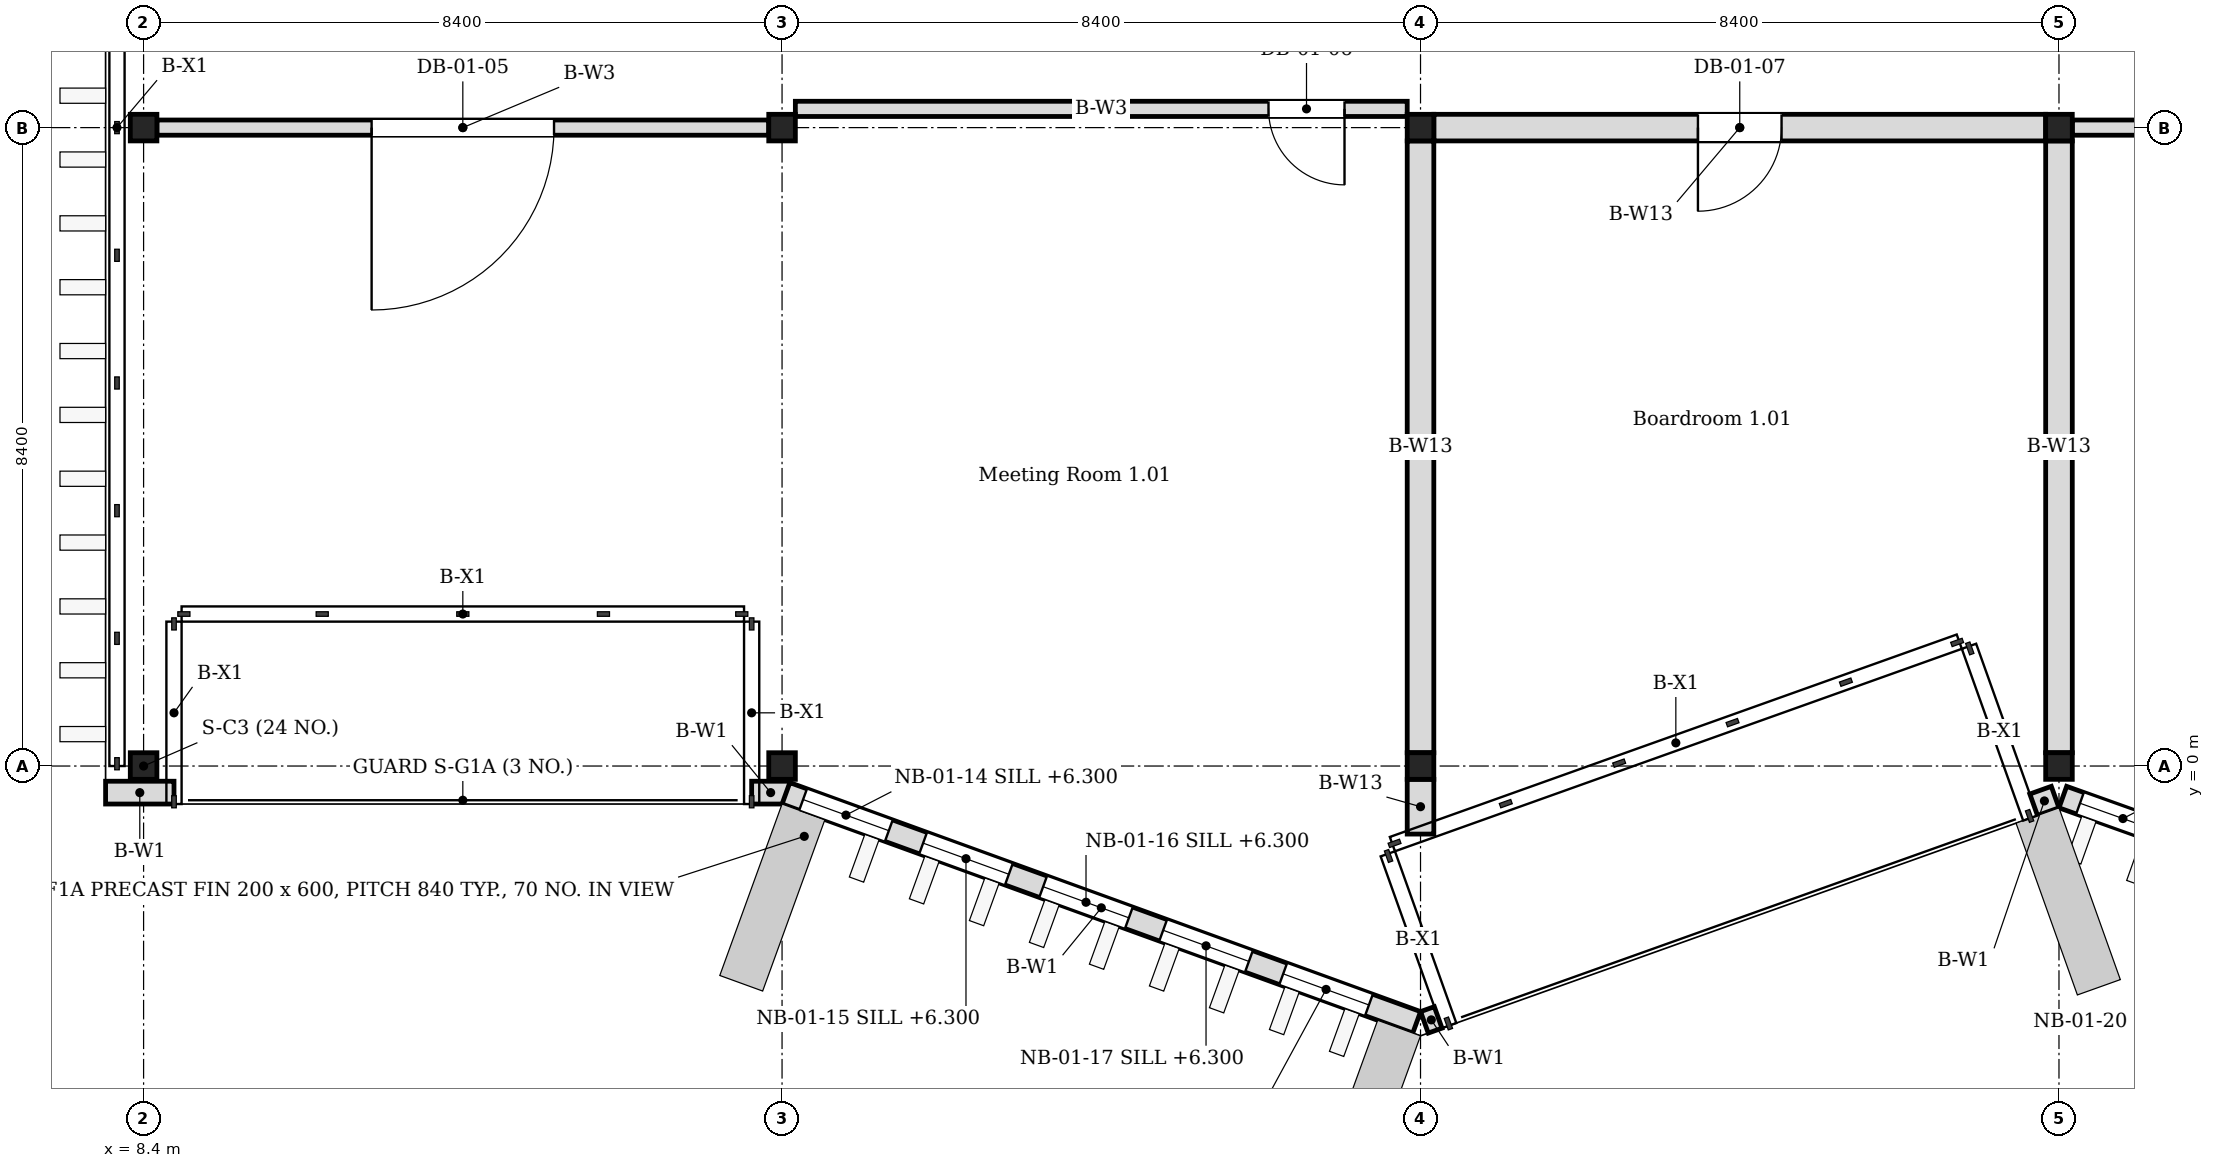
"""IFC4 building model, lengths in metres.
Left out: names, types, materials, properties, quantities, classifications, styles, units other than length and angle.
Written with IfcOpenShell. Run it as: python <this file> out.ifc"""

import sys

from ifc_helpers import new_model, si_unit, direction, frame, frame_2d, origin, origin_2d, place, context, subcontext, project, spatial, rectangle, i_section, extrude, element, fill, save


model = new_model("IFC4")
c1 = context("Model", 3, precision=1e-05, world=origin(), true_north=direction((0.0, 1.0)))
c2 = subcontext(c1, "Body", "Model", "MODEL_VIEW")
j1 = project(units=[si_unit("LENGTHUNIT", "METRE"), si_unit("PLANEANGLEUNIT", "RADIAN")], contexts=[c1])
p1 = place(None, origin())
s1 = spatial("IfcSite", under=j1, at=p1, CompositionType="ELEMENT")
p2 = place(p1, origin())
s2 = spatial("IfcBuilding", under=s1, at=p2, CompositionType="ELEMENT")
p3 = place(p2, frame((0.0, 0.0, 6.0)))
s3 = spatial("IfcBuildingStorey", under=s2, at=p3, CompositionType="ELEMENT", Elevation=6.0)
for number, where, z_axis, x_axis in (
    (1, (8.4, 0.0, 0.0), (0.0, 0.0, 1.0), (1.0, 0.0, 0.0)),
    (2, (8.4, 8.4, 0.0), (0.0, 0.0, 1.0), (1.0, 0.0, 0.0)),
    (3, (16.8, 0.0, 0.0), (0.0, 0.0, 1.0), (1.0, 0.0, 0.0)),
    (4, (16.8, 8.4, 0.0), (0.0, 0.0, 1.0), (1.0, 0.0, 0.0)),
    (5, (25.2, 0.0, 0.0), (0.0, 0.0, 1.0), (1.0, 0.0, 0.0)),
    (6, (25.2, 8.4, 0.0), (0.0, 0.0, 1.0), (1.0, 0.0, 0.0)),
    (7, (33.6, 0.0, 0.0), (0.0, 0.0, 1.0), (1.0, 0.0, 0.0)),
    (8, (33.6, 8.4, 0.0), (0.0, 0.0, 1.0), (1.0, 0.0, 0.0)),
):
    element("IfcColumn", number, at=place(p3, frame(where, z_axis=z_axis, x_axis=x_axis)), inside=s3, PredefinedType="COLUMN", context=c2, shape_type="SweptSolid", body=[
        extrude(i_section(OverallWidth=0.35, OverallDepth=0.35, WebThickness=0.012, FlangeThickness=0.019, FilletRadius=0.013, at=origin_2d()), origin(), (0.0, 0.0, 1.0), 4.2),
    ])
p4 = place(p3, frame((7.9, -0.35, 0.0), z_axis=(0.0, 0.0, 1.0), x_axis=(1.0, 0.0, 0.0)))
e9 = element("IfcWall", 9, at=p4, inside=s3, PredefinedType="SOLIDWALL", context=c2, shape_type="SweptSolid", body=[
    extrude(rectangle(XDim=0.9, YDim=0.3, at=frame_2d((0.45, 0.0))), origin(), (0.0, 0.0, 1.0), 4.05),
])
p5 = place(p3, frame((16.4, -0.35, 0.0), z_axis=(0.0, 0.0, 1.0), x_axis=(1.0, 0.0, 0.0)))
e10 = element("IfcWall", 10, at=p5, inside=s3, PredefinedType="SOLIDWALL", context=c2, shape_type="SweptSolid", body=[
    extrude(rectangle(XDim=0.5, YDim=0.3, at=frame_2d((0.25, 0.0))), origin(), (0.0, 0.0, 1.0), 4.05),
])
p6 = place(p3, frame((16.851, -0.359, 0.0), z_axis=(0.0, 0.0, 1.0), x_axis=(0.939953187971, -0.341303390584, 0.0)))
e11 = element("IfcWall", 11, at=p6, inside=s3, PredefinedType="SOLIDWALL", context=c2, shape_type="SweptSolid", body=[
    extrude(rectangle(XDim=8.828, YDim=0.3, at=frame_2d((4.414, 0.0))), origin(), (0.0, 0.0, 1.0), 4.05),
])
p7 = place(p6, frame((0.24, 0.0, 0.3)))
e12 = element("IfcOpeningElement", 12, at=p7, cuts=e11, PredefinedType="OPENING", context=c2, shape_type="SweptSolid", body=[
    extrude(rectangle(XDim=1.2, YDim=3.3, at=frame_2d((0.6, 1.65))), frame((0.0, 0.16, 0.0), z_axis=(0.0, -1.0, 0.0), x_axis=(1.0, 0.0, 0.0)), (0.0, 0.0, 1.0), 0.32),
])
p8 = place(p6, frame((1.92, 0.0, 0.3)))
e13 = element("IfcOpeningElement", 13, at=p8, cuts=e11, PredefinedType="OPENING", context=c2, shape_type="SweptSolid", body=[
    extrude(rectangle(XDim=1.2, YDim=3.3, at=frame_2d((0.6, 1.65))), frame((0.0, 0.16, 0.0), z_axis=(0.0, -1.0, 0.0), x_axis=(1.0, 0.0, 0.0)), (0.0, 0.0, 1.0), 0.32),
])
p9 = place(p6, frame((3.6, 0.0, 0.3)))
e14 = element("IfcOpeningElement", 14, at=p9, cuts=e11, PredefinedType="OPENING", context=c2, shape_type="SweptSolid", body=[
    extrude(rectangle(XDim=1.2, YDim=3.3, at=frame_2d((0.6, 1.65))), frame((0.0, 0.16, 0.0), z_axis=(0.0, -1.0, 0.0), x_axis=(1.0, 0.0, 0.0)), (0.0, 0.0, 1.0), 0.32),
])
p10 = place(p6, frame((5.28, 0.0, 0.3)))
e15 = element("IfcOpeningElement", 15, at=p10, cuts=e11, PredefinedType="OPENING", context=c2, shape_type="SweptSolid", body=[
    extrude(rectangle(XDim=1.2, YDim=3.3, at=frame_2d((0.6, 1.65))), frame((0.0, 0.16, 0.0), z_axis=(0.0, -1.0, 0.0), x_axis=(1.0, 0.0, 0.0)), (0.0, 0.0, 1.0), 0.32),
])
p11 = place(p6, frame((6.96, 0.0, 0.3)))
e16 = element("IfcOpeningElement", 16, at=p11, cuts=e11, PredefinedType="OPENING", context=c2, shape_type="SweptSolid", body=[
    extrude(rectangle(XDim=1.2, YDim=3.3, at=frame_2d((0.6, 1.65))), frame((0.0, 0.16, 0.0), z_axis=(0.0, -1.0, 0.0), x_axis=(1.0, 0.0, 0.0)), (0.0, 0.0, 1.0), 0.32),
])
p12 = place(p3, frame((25.251, -3.372, 0.0), z_axis=(0.0, 0.0, 1.0), x_axis=(0.942000485661, 0.335611509061, 0.0)))
e17 = element("IfcWall", 17, at=p12, inside=s3, PredefinedType="SOLIDWALL", context=c2, shape_type="SweptSolid", body=[
    extrude(rectangle(XDim=0.192, YDim=0.3, at=frame_2d((0.096, 0.0))), origin(), (0.0, 0.0, 1.0), 4.05),
])
p13 = place(p3, frame((33.267, -0.51, 0.0), z_axis=(0.0, 0.0, 1.0), x_axis=(0.941797147708, 0.336181695768, 0.0)))
e18 = element("IfcWall", 18, at=p13, inside=s3, PredefinedType="SOLIDWALL", context=c2, shape_type="SweptSolid", body=[
    extrude(rectangle(XDim=0.3, YDim=0.3, at=frame_2d((0.15, 0.0))), origin(), (0.0, 0.0, 1.0), 4.05),
])
p14 = place(p3, frame((33.65, -0.409, 0.0), z_axis=(0.0, 0.0, 1.0), x_axis=(0.941736270411, -0.336352191894, 0.0)))
e19 = element("IfcWall", 19, at=p14, inside=s3, PredefinedType="SOLIDWALL", context=c2, shape_type="SweptSolid", body=[
    extrude(rectangle(XDim=8.812, YDim=0.3, at=frame_2d((4.406, 0.0))), origin(), (0.0, 0.0, 1.0), 4.05),
])
p15 = place(p14, frame((0.24, 0.0, 0.3)))
e20 = element("IfcOpeningElement", 20, at=p15, cuts=e19, PredefinedType="OPENING", context=c2, shape_type="SweptSolid", body=[
    extrude(rectangle(XDim=1.2, YDim=3.3, at=frame_2d((0.6, 1.65))), frame((0.0, 0.16, 0.0), z_axis=(0.0, -1.0, 0.0), x_axis=(1.0, 0.0, 0.0)), (0.0, 0.0, 1.0), 0.32),
])
p16 = place(p14, frame((1.92, 0.0, 0.3)))
e21 = element("IfcOpeningElement", 21, at=p16, cuts=e19, PredefinedType="OPENING", context=c2, shape_type="SweptSolid", body=[
    extrude(rectangle(XDim=1.2, YDim=3.3, at=frame_2d((0.6, 1.65))), frame((0.0, 0.16, 0.0), z_axis=(0.0, -1.0, 0.0), x_axis=(1.0, 0.0, 0.0)), (0.0, 0.0, 1.0), 0.32),
])
p17 = place(p14, frame((3.6, 0.0, 0.3)))
e22 = element("IfcOpeningElement", 22, at=p17, cuts=e19, PredefinedType="OPENING", context=c2, shape_type="SweptSolid", body=[
    extrude(rectangle(XDim=1.2, YDim=3.3, at=frame_2d((0.6, 1.65))), frame((0.0, 0.16, 0.0), z_axis=(0.0, -1.0, 0.0), x_axis=(1.0, 0.0, 0.0)), (0.0, 0.0, 1.0), 0.32),
])
p18 = place(p14, frame((5.28, 0.0, 0.3)))
e23 = element("IfcOpeningElement", 23, at=p18, cuts=e19, PredefinedType="OPENING", context=c2, shape_type="SweptSolid", body=[
    extrude(rectangle(XDim=1.2, YDim=3.3, at=frame_2d((0.6, 1.65))), frame((0.0, 0.16, 0.0), z_axis=(0.0, -1.0, 0.0), x_axis=(1.0, 0.0, 0.0)), (0.0, 0.0, 1.0), 0.32),
])
p19 = place(p14, frame((6.96, 0.0, 0.3)))
e24 = element("IfcOpeningElement", 24, at=p19, cuts=e19, PredefinedType="OPENING", context=c2, shape_type="SweptSolid", body=[
    extrude(rectangle(XDim=1.2, YDim=3.3, at=frame_2d((0.6, 1.65))), frame((0.0, 0.16, 0.0), z_axis=(0.0, -1.0, 0.0), x_axis=(1.0, 0.0, 0.0)), (0.0, 0.0, 1.0), 0.32),
])
p20 = place(p3, frame((8.575, 8.4, 0.0), z_axis=(0.0, 0.0, 1.0), x_axis=(1.0, 0.0, 0.0)))
e25 = element("IfcWall", 25, at=p20, inside=s3, PredefinedType="PARTITIONING", context=c2, shape_type="SweptSolid", body=[
    extrude(rectangle(XDim=8.05, YDim=0.2, at=frame_2d((4.025, 0.0))), origin(), (0.0, 0.0, 1.0), 3.35),
])
p21 = place(p20, frame((2.825, 0.0, 0.0)))
e26 = element("IfcOpeningElement", 26, at=p21, cuts=e25, PredefinedType="OPENING", context=c2, shape_type="SweptSolid", body=[
    extrude(rectangle(XDim=2.4, YDim=2.2, at=frame_2d((1.2, 1.1))), frame((0.0, 0.11, 0.0), z_axis=(0.0, -1.0, 0.0), x_axis=(1.0, 0.0, 0.0)), (0.0, 0.0, 1.0), 0.22),
])
p22 = place(p3, frame((16.975, 8.646, 0.0), z_axis=(0.0, 0.0, 1.0), x_axis=(1.0, 0.0, 0.0)))
e27 = element("IfcWall", 27, at=p22, inside=s3, PredefinedType="PARTITIONING", context=c2, shape_type="SweptSolid", body=[
    extrude(rectangle(XDim=8.05, YDim=0.2, at=frame_2d((4.025, 0.0))), origin(), (0.0, 0.0, 1.0), 3.35),
])
p23 = place(p22, frame((6.225, 0.0, 0.0)))
e28 = element("IfcOpeningElement", 28, at=p23, cuts=e27, PredefinedType="OPENING", context=c2, shape_type="SweptSolid", body=[
    extrude(rectangle(XDim=1.0, YDim=2.1, at=frame_2d((0.5, 1.05))), frame((0.0, 0.11, 0.0), z_axis=(0.0, -1.0, 0.0), x_axis=(1.0, 0.0, 0.0)), (0.0, 0.0, 1.0), 0.22),
])
p24 = place(p3, frame((25.375, 8.4, 0.0), z_axis=(0.0, 0.0, 1.0), x_axis=(1.0, 0.0, 0.0)))
e29 = element("IfcWall", 29, at=p24, inside=s3, PredefinedType="PARTITIONING", context=c2, shape_type="SweptSolid", body=[
    extrude(rectangle(XDim=8.05, YDim=0.35, at=frame_2d((4.025, 0.0))), origin(), (0.0, 0.0, 1.0), 3.35),
])
p25 = place(p24, frame((3.475, 0.0, 0.0)))
e30 = element("IfcOpeningElement", 30, at=p25, cuts=e29, PredefinedType="OPENING", context=c2, shape_type="SweptSolid", body=[
    extrude(rectangle(XDim=1.1, YDim=2.4, at=frame_2d((0.55, 1.2))), frame((0.0, 0.185, 0.0), z_axis=(0.0, -1.0, 0.0), x_axis=(1.0, 0.0, 0.0)), (0.0, 0.0, 1.0), 0.37),
])
p26 = place(p3, frame((33.775, 8.4, 0.0), z_axis=(0.0, 0.0, 1.0), x_axis=(1.0, 0.0, 0.0)))
e31 = element("IfcWall", 31, at=p26, inside=s3, PredefinedType="PARTITIONING", context=c2, shape_type="SweptSolid", body=[
    extrude(rectangle(XDim=8.05, YDim=0.2, at=frame_2d((4.025, 0.0))), origin(), (0.0, 0.0, 1.0), 3.35),
])
p27 = place(p26, frame((2.825, 0.0, 0.0)))
e32 = element("IfcOpeningElement", 32, at=p27, cuts=e31, PredefinedType="OPENING", context=c2, shape_type="SweptSolid", body=[
    extrude(rectangle(XDim=2.4, YDim=2.2, at=frame_2d((1.2, 1.1))), frame((0.0, 0.11, 0.0), z_axis=(0.0, -1.0, 0.0), x_axis=(1.0, 0.0, 0.0)), (0.0, 0.0, 1.0), 0.22),
])
p28 = place(p3, frame((25.2, -0.895, 0.0), z_axis=(0.0, 0.0, 1.0), x_axis=(0.0, 1.0, 0.0)))
e33 = element("IfcWall", 33, at=p28, inside=s3, PredefinedType="PARTITIONING", context=c2, shape_type="SweptSolid", body=[
    extrude(rectangle(XDim=0.72, YDim=0.35, at=frame_2d((0.36, 0.0))), origin(), (0.0, 0.0, 1.0), 3.35),
])
for number, where, z_axis, x_axis in (
    (34, (25.2, 0.175, 0.0), (0.0, 0.0, 1.0), (0.0, 1.0, 0.0)),
    (35, (33.6, 0.175, 0.0), (0.0, 0.0, 1.0), (0.0, 1.0, 0.0)),
):
    element("IfcWall", number, at=place(p3, frame(where, z_axis=z_axis, x_axis=x_axis)), inside=s3, PredefinedType="PARTITIONING", context=c2, shape_type="SweptSolid", body=[
        extrude(rectangle(XDim=8.05, YDim=0.35, at=frame_2d((4.025, 0.0))), origin(), (0.0, 0.0, 1.0), 3.35),
    ])
p29 = place(p7, origin())
e36 = element("IfcWindow", 36, at=p29, inside=s3, PartitioningType="TRIPLE_PANEL_VERTICAL", PredefinedType="WINDOW", context=c2, shape_type="SweptSolid", body=[
    extrude(rectangle(XDim=1.2, YDim=3.3, at=frame_2d((0.6, 1.65))), frame((0.0, 0.03, 0.0), z_axis=(0.0, -1.0, 0.0), x_axis=(1.0, 0.0, 0.0)), (0.0, 0.0, 1.0), 0.06),
])
fill(e12, e36)
p30 = place(p8, origin())
e37 = element("IfcWindow", 37, at=p30, inside=s3, PartitioningType="TRIPLE_PANEL_VERTICAL", PredefinedType="WINDOW", context=c2, shape_type="SweptSolid", body=[
    extrude(rectangle(XDim=1.2, YDim=3.3, at=frame_2d((0.6, 1.65))), frame((0.0, 0.03, 0.0), z_axis=(0.0, -1.0, 0.0), x_axis=(1.0, 0.0, 0.0)), (0.0, 0.0, 1.0), 0.06),
])
fill(e13, e37)
p31 = place(p9, origin())
e38 = element("IfcWindow", 38, at=p31, inside=s3, PartitioningType="TRIPLE_PANEL_VERTICAL", PredefinedType="WINDOW", context=c2, shape_type="SweptSolid", body=[
    extrude(rectangle(XDim=1.2, YDim=3.3, at=frame_2d((0.6, 1.65))), frame((0.0, 0.03, 0.0), z_axis=(0.0, -1.0, 0.0), x_axis=(1.0, 0.0, 0.0)), (0.0, 0.0, 1.0), 0.06),
])
fill(e14, e38)
p32 = place(p10, origin())
e39 = element("IfcWindow", 39, at=p32, inside=s3, PartitioningType="TRIPLE_PANEL_VERTICAL", PredefinedType="WINDOW", context=c2, shape_type="SweptSolid", body=[
    extrude(rectangle(XDim=1.2, YDim=3.3, at=frame_2d((0.6, 1.65))), frame((0.0, 0.03, 0.0), z_axis=(0.0, -1.0, 0.0), x_axis=(1.0, 0.0, 0.0)), (0.0, 0.0, 1.0), 0.06),
])
fill(e15, e39)
p33 = place(p11, origin())
e40 = element("IfcWindow", 40, at=p33, inside=s3, PartitioningType="TRIPLE_PANEL_VERTICAL", PredefinedType="WINDOW", context=c2, shape_type="SweptSolid", body=[
    extrude(rectangle(XDim=1.2, YDim=3.3, at=frame_2d((0.6, 1.65))), frame((0.0, 0.03, 0.0), z_axis=(0.0, -1.0, 0.0), x_axis=(1.0, 0.0, 0.0)), (0.0, 0.0, 1.0), 0.06),
])
fill(e16, e40)
p34 = place(p15, origin())
e41 = element("IfcWindow", 41, at=p34, inside=s3, PartitioningType="TRIPLE_PANEL_VERTICAL", PredefinedType="WINDOW", context=c2, shape_type="SweptSolid", body=[
    extrude(rectangle(XDim=1.2, YDim=3.3, at=frame_2d((0.6, 1.65))), frame((0.0, 0.03, 0.0), z_axis=(0.0, -1.0, 0.0), x_axis=(1.0, 0.0, 0.0)), (0.0, 0.0, 1.0), 0.06),
])
fill(e20, e41)
p35 = place(p21, origin())
e42 = element("IfcDoor", 42, at=p35, inside=s3, OperationType="DOUBLE_DOOR_SINGLE_SWING", PredefinedType="DOOR", context=c2, shape_type="SweptSolid", body=[
    extrude(rectangle(XDim=2.4, YDim=2.2, at=frame_2d((1.2, 1.1))), frame((0.0, 0.025, 0.0), z_axis=(0.0, -1.0, 0.0), x_axis=(1.0, 0.0, 0.0)), (0.0, 0.0, 1.0), 0.05),
])
fill(e26, e42)
p36 = place(p23, origin())
e43 = element("IfcDoor", 43, at=p36, inside=s3, OperationType="SINGLE_SWING_LEFT", PredefinedType="DOOR", context=c2, shape_type="SweptSolid", body=[
    extrude(rectangle(XDim=1.0, YDim=2.1, at=frame_2d((0.5, 1.05))), frame((0.0, 0.025, 0.0), z_axis=(0.0, -1.0, 0.0), x_axis=(1.0, 0.0, 0.0)), (0.0, 0.0, 1.0), 0.05),
])
fill(e28, e43)
p37 = place(p25, origin())
e44 = element("IfcDoor", 44, at=p37, inside=s3, OperationType="SINGLE_SWING_LEFT", PredefinedType="DOOR", context=c2, shape_type="SweptSolid", body=[
    extrude(rectangle(XDim=1.1, YDim=2.4, at=frame_2d((0.55, 1.2))), frame((0.0, 0.025, 0.0), z_axis=(0.0, -1.0, 0.0), x_axis=(1.0, 0.0, 0.0)), (0.0, 0.0, 1.0), 0.05),
])
fill(e30, e44)
save(model, sys.argv[1])
